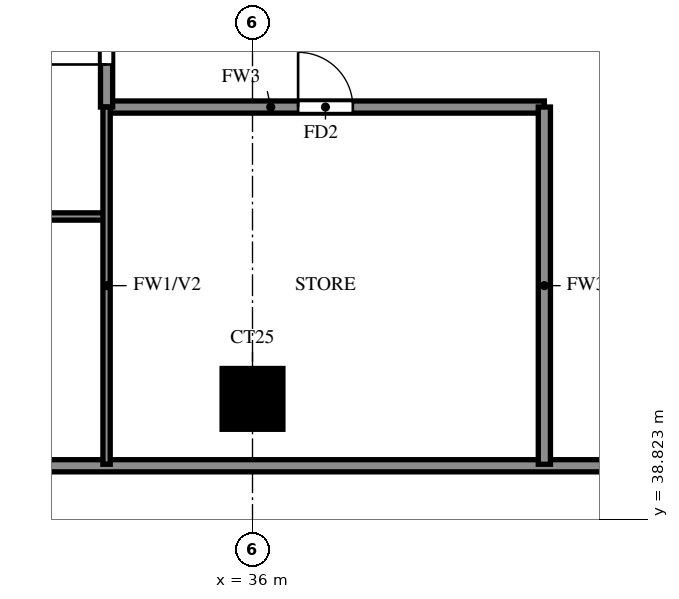
"""IFC4 building model, lengths in metres.
Left out: names, types, materials, properties, quantities, classifications, styles, units other than length and angle.
Written with IfcOpenShell. Run it as: python <this file> out.ifc"""

import sys

from ifc_helpers import new_model, si_unit, direction, frame, frame_2d, origin, origin_2d, place, context, subcontext, project, spatial, rectangle, extrude, source, transform, mapped, element, fill, save


model = new_model("IFC4")
c1 = context("Model", 3, precision=1e-05, world=origin(), true_north=direction((0.0, 1.0)))
c2 = subcontext(c1, "Body", "Model", "MODEL_VIEW")
j1 = project(units=[si_unit("LENGTHUNIT", "METRE"), si_unit("PLANEANGLEUNIT", "RADIAN")], contexts=[c1])
p1 = place(None, origin())
s1 = spatial("IfcSite", under=j1, at=p1, CompositionType="ELEMENT")
p2 = place(p1, origin())
s2 = spatial("IfcBuilding", under=s1, at=p2, CompositionType="ELEMENT")
p3 = place(p2, frame((0.0, 0.0, 157.0)))
s3 = spatial("IfcBuildingStorey", under=s2, at=p3, CompositionType="ELEMENT", Elevation=157.0)
m1 = source(origin(), c2, "Body", "SweptSolid", [
    extrude(rectangle(XDim=1.0, YDim=1.0, at=origin_2d()), origin(), (0.0, 0.0, 1.0), 3.2),
])
p4 = place(p3, frame((36.0, 40.8, 0.0), z_axis=(0.0, 0.0, 1.0), x_axis=(1.0, 0.0, 0.0)))
e1 = element("IfcColumn", 1, at=p4, inside=s3, PredefinedType="COLUMN", context=c2, shape_type="MappedRepresentation", body=[
    mapped(m1, transform((0.0, 0.0, 0.0))),
])
p5 = place(p3, frame((18.2, 39.7, 0.0), z_axis=(0.0, 0.0, 1.0), x_axis=(1.0, 0.0, 0.0)))
e2 = element("IfcWall", 2, at=p5, inside=s3, PredefinedType="SOLIDWALL", context=c2, shape_type="SweptSolid", body=[
    extrude(rectangle(XDim=23.8, YDim=0.2, at=frame_2d((11.9, 0.0))), origin(), (0.0, 0.0, 1.0), 3.2),
])
p6 = place(p5, frame((4.3, 0.0, 0.0)))
e3 = element("IfcOpeningElement", 3, at=p6, cuts=e2, PredefinedType="OPENING", context=c2, shape_type="SweptSolid", body=[
    extrude(rectangle(XDim=1.8, YDim=2.4, at=frame_2d((0.9, 1.2))), frame((0.0, 0.11, 0.0), z_axis=(0.0, -1.0, 0.0), x_axis=(1.0, 0.0, 0.0)), (0.0, 0.0, 1.0), 0.22),
])
p7 = place(p5, frame((1.9, 0.0, 0.6)))
e4 = element("IfcOpeningElement", 4, at=p7, cuts=e2, PredefinedType="OPENING", context=c2, shape_type="SweptSolid", body=[
    extrude(rectangle(XDim=1.8, YDim=2.4, at=frame_2d((0.9, 1.2))), frame((0.0, 0.11, 0.0), z_axis=(0.0, -1.0, 0.0), x_axis=(1.0, 0.0, 0.0)), (0.0, 0.0, 1.0), 0.22),
])
p8 = place(p5, frame((11.8, 0.0, 0.6)))
e5 = element("IfcOpeningElement", 5, at=p8, cuts=e2, PredefinedType="OPENING", context=c2, shape_type="SweptSolid", body=[
    extrude(rectangle(XDim=2.4, YDim=2.4, at=frame_2d((1.2, 1.2))), frame((0.0, 0.11, 0.0), z_axis=(0.0, -1.0, 0.0), x_axis=(1.0, 0.0, 0.0)), (0.0, 0.0, 1.0), 0.22),
])
p9 = place(p5, frame((8.95, 0.0, 1.5)))
e6 = element("IfcOpeningElement", 6, at=p9, cuts=e2, PredefinedType="OPENING", context=c2, shape_type="SweptSolid", body=[
    extrude(rectangle(XDim=0.9, YDim=0.9, at=frame_2d((0.45, 0.45))), frame((0.0, 0.11, 0.0), z_axis=(0.0, -1.0, 0.0), x_axis=(1.0, 0.0, 0.0)), (0.0, 0.0, 1.0), 0.22),
])
p10 = place(p3, frame((33.6, 45.6, 0.0), z_axis=(0.0, 0.0, 1.0), x_axis=(1.0, 0.0, 0.0)))
e7 = element("IfcWall", 7, at=p10, inside=s3, PredefinedType="SOLIDWALL", context=c2, shape_type="SweptSolid", body=[
    extrude(rectangle(XDim=7.2, YDim=0.2, at=frame_2d((3.6, 0.0))), origin(), (0.0, 0.0, 1.0), 3.2),
])
p11 = place(p10, frame((3.15, 0.0, 0.0)))
e8 = element("IfcOpeningElement", 8, at=p11, cuts=e7, PredefinedType="OPENING", context=c2, shape_type="SweptSolid", body=[
    extrude(rectangle(XDim=0.9, YDim=2.1, at=frame_2d((0.45, 1.05))), frame((0.0, 0.11, 0.0), z_axis=(0.0, -1.0, 0.0), x_axis=(1.0, 0.0, 0.0)), (0.0, 0.0, 1.0), 0.22),
])
p12 = place(p3, frame((33.6, 45.6, 0.0), z_axis=(0.0, 0.0, 1.0), x_axis=(0.0, 1.0, 0.0)))
e9 = element("IfcWall", 9, at=p12, inside=s3, PredefinedType="SOLIDWALL", context=c2, shape_type="SweptSolid", body=[
    extrude(rectangle(XDim=2.4, YDim=0.2, at=frame_2d((1.2, 0.0))), origin(), (0.0, 0.0, 1.0), 3.2),
])
p13 = place(p12, frame((0.7, 0.0, 0.0)))
e10 = element("IfcOpeningElement", 10, at=p13, cuts=e9, PredefinedType="OPENING", context=c2, shape_type="SweptSolid", body=[
    extrude(rectangle(XDim=1.0, YDim=2.1, at=frame_2d((0.5, 1.05))), frame((0.0, 0.11, 0.0), z_axis=(0.0, -1.0, 0.0), x_axis=(1.0, 0.0, 0.0)), (0.0, 0.0, 1.0), 0.22),
])
p14 = place(p3, frame((40.8, 39.725, 0.0), z_axis=(0.0, 0.0, 1.0), x_axis=(0.0, 1.0, 0.0)))
e11 = element("IfcWall", 11, at=p14, inside=s3, PredefinedType="SOLIDWALL", context=c2, shape_type="SweptSolid", body=[
    extrude(rectangle(XDim=5.875, YDim=0.2, at=frame_2d((2.938, 0.0))), origin(), (0.0, 0.0, 1.0), 3.2),
])
p15 = place(p3, frame((28.8, 43.8, 0.0), z_axis=(0.0, 0.0, 1.0), x_axis=(1.0, 0.0, 0.0)))
e12 = element("IfcWall", 12, at=p15, inside=s3, PredefinedType="PARTITIONING", context=c2, shape_type="SweptSolid", body=[
    extrude(rectangle(XDim=4.8, YDim=0.12, at=frame_2d((2.4, 0.0))), origin(), (0.0, 0.0, 1.0), 3.2),
])
p16 = place(p15, frame((1.95, 0.0, 0.0)))
e13 = element("IfcOpeningElement", 13, at=p16, cuts=e12, PredefinedType="OPENING", context=c2, shape_type="SweptSolid", body=[
    extrude(rectangle(XDim=0.9, YDim=2.1, at=frame_2d((0.45, 1.05))), frame((0.0, 0.07, 0.0), z_axis=(0.0, -1.0, 0.0), x_axis=(1.0, 0.0, 0.0)), (0.0, 0.0, 1.0), 0.14),
])
p17 = place(p3, frame((33.6, 39.725, 0.0), z_axis=(0.0, 0.0, 1.0), x_axis=(0.0, 1.0, 0.0)))
e14 = element("IfcWall", 14, at=p17, inside=s3, PredefinedType="PARTITIONING", context=c2, shape_type="SweptSolid", body=[
    extrude(rectangle(XDim=5.875, YDim=0.12, at=frame_2d((2.938, 0.0))), origin(), (0.0, 0.0, 1.0), 3.2),
])
p18 = place(p13, origin())
e15 = element("IfcDoor", 15, at=p18, inside=s3, OperationType="SINGLE_SWING_LEFT", PredefinedType="DOOR", context=c2, shape_type="SweptSolid", body=[
    extrude(rectangle(XDim=1.0, YDim=2.1, at=frame_2d((0.5, 1.05))), frame((0.0, 0.025, 0.0), z_axis=(0.0, -1.0, 0.0), x_axis=(1.0, 0.0, 0.0)), (0.0, 0.0, 1.0), 0.05),
])
fill(e10, e15)
p19 = place(p11, origin())
e16 = element("IfcDoor", 16, at=p19, inside=s3, OperationType="SINGLE_SWING_LEFT", PredefinedType="DOOR", context=c2, shape_type="SweptSolid", body=[
    extrude(rectangle(XDim=0.9, YDim=2.1, at=frame_2d((0.45, 1.05))), frame((0.0, 0.025, 0.0), z_axis=(0.0, -1.0, 0.0), x_axis=(1.0, 0.0, 0.0)), (0.0, 0.0, 1.0), 0.05),
])
fill(e8, e16)
save(model, sys.argv[1])
